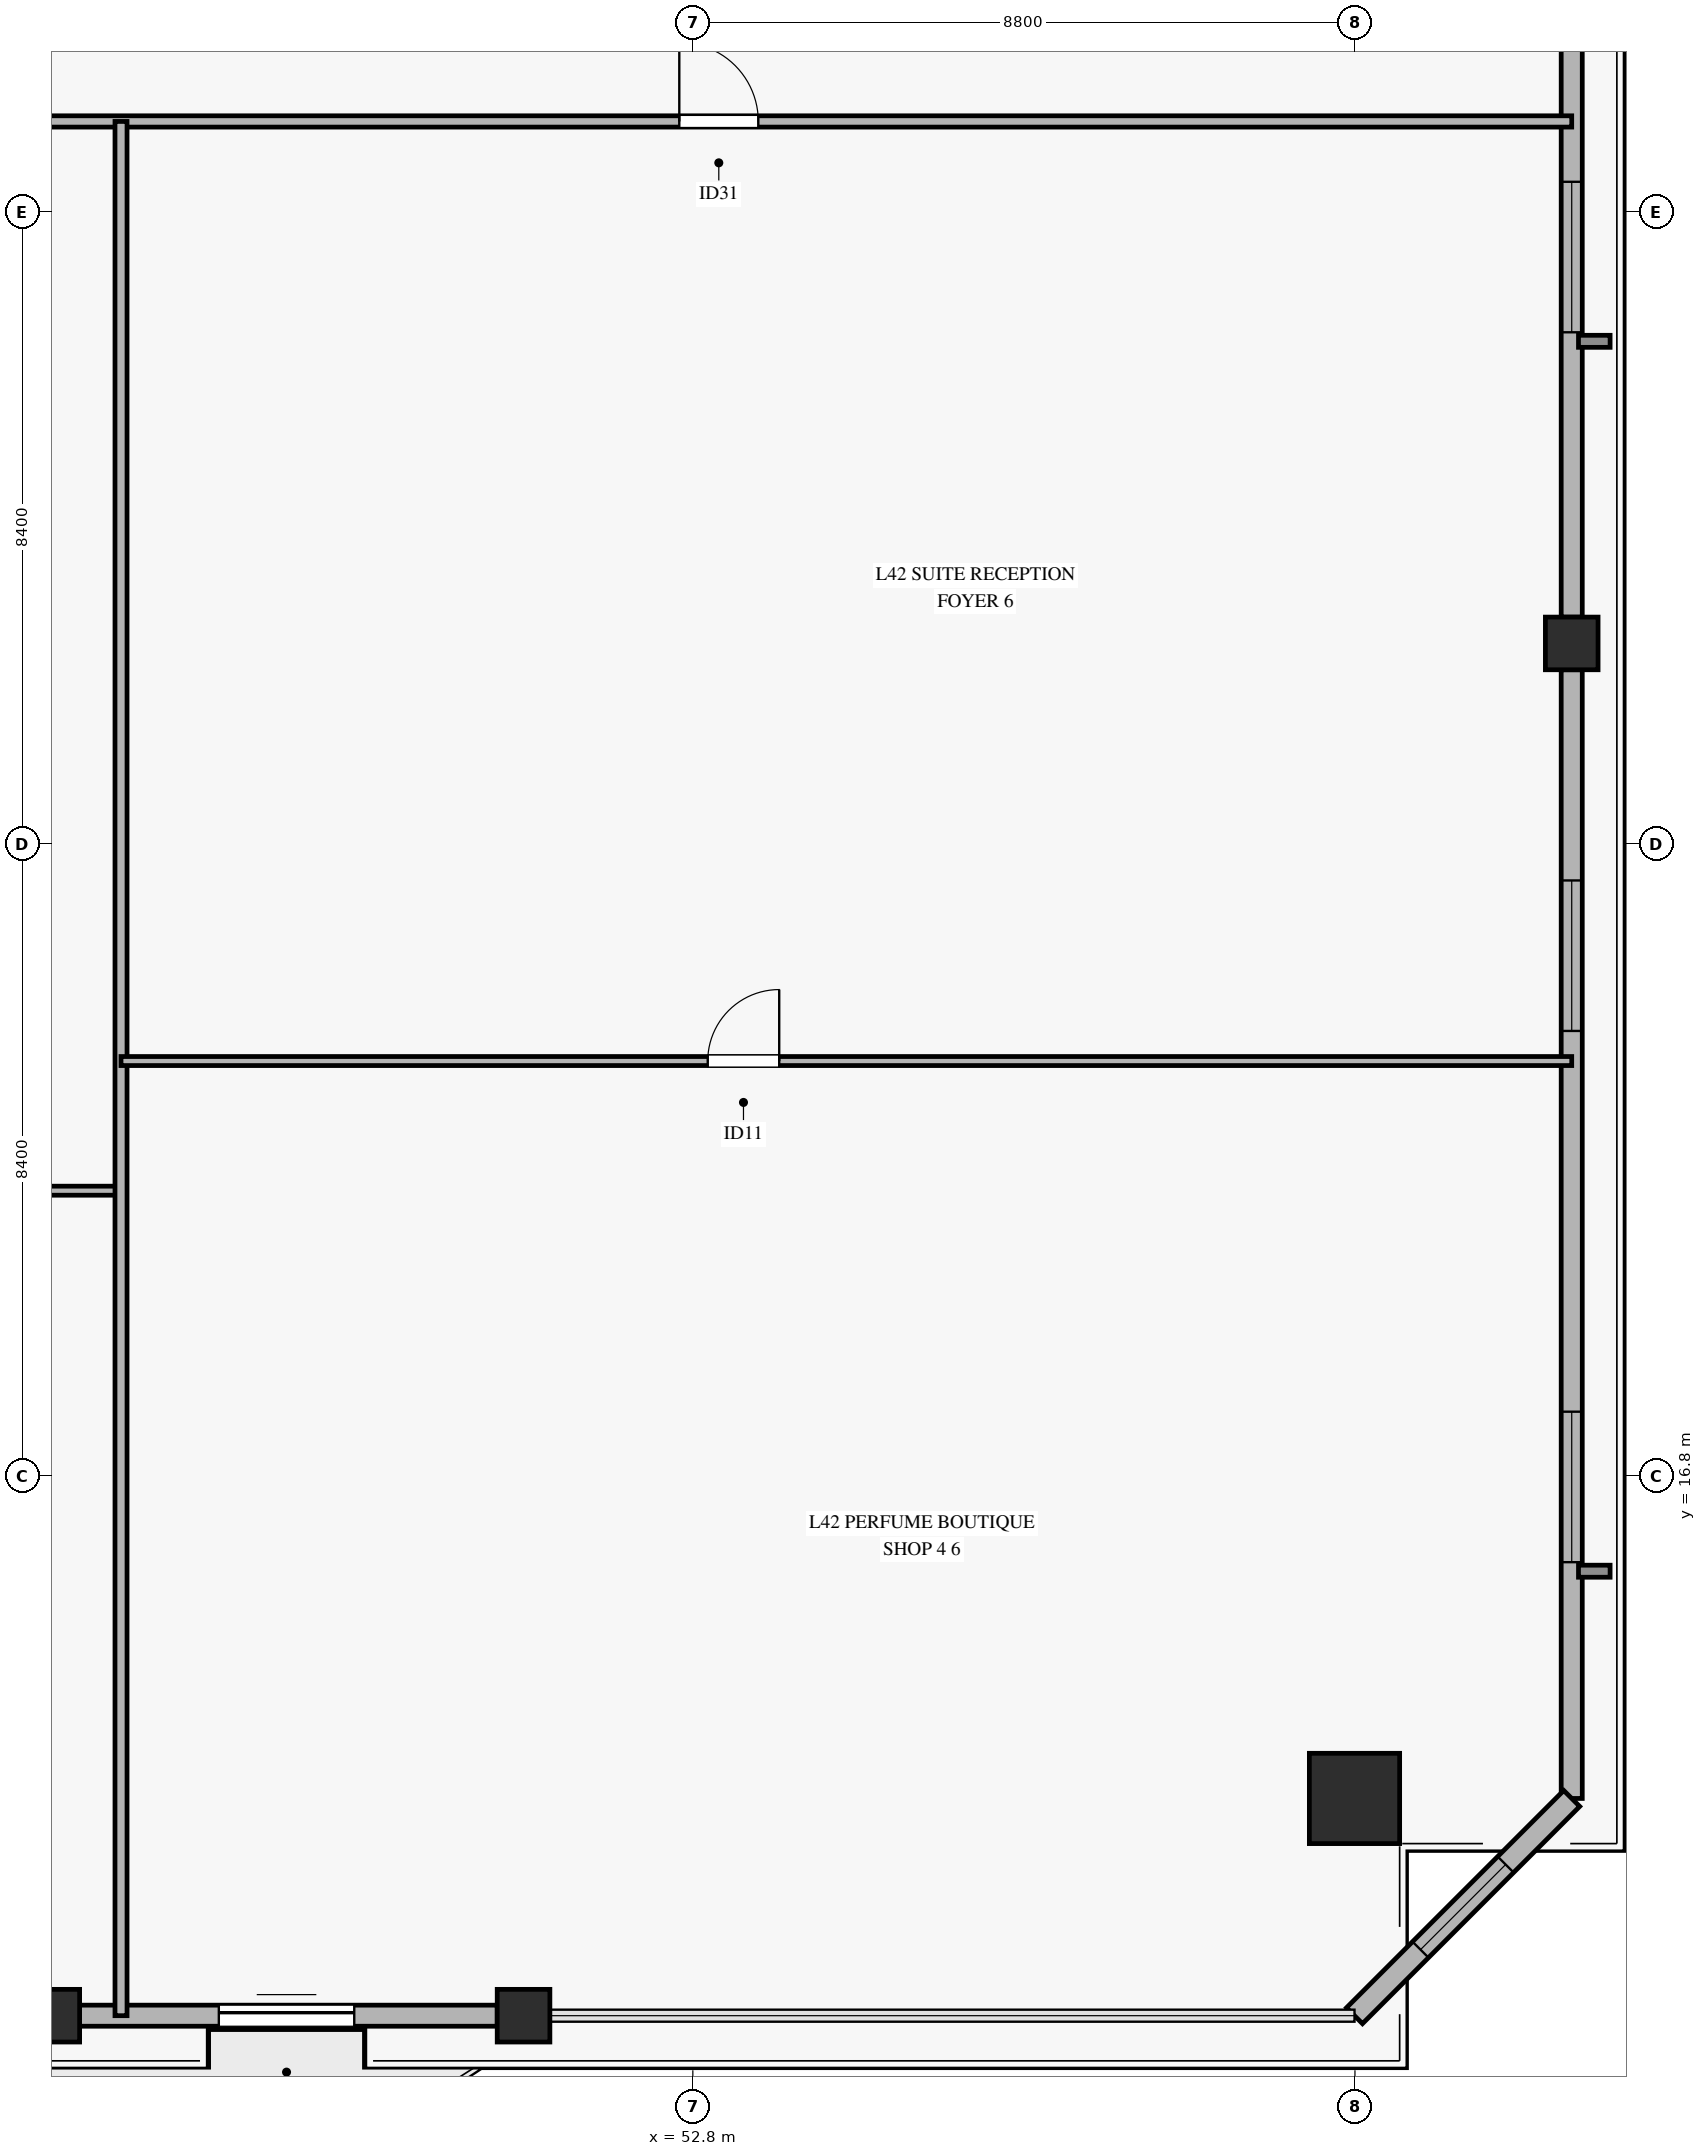
"""IFC4 building model, lengths in metres.
Left out: names, types, materials, properties, quantities, classifications, styles, units other than length and angle.
Written with IfcOpenShell. Run it as: python <this file> out.ifc"""

import sys

from ifc_helpers import new_model, si_unit, direction, frame, frame_2d, origin, origin_2d, place, context, subcontext, project, spatial, rectangle, hollow_rectangle, extrude, source, transform, mapped, element, fill, save


model = new_model("IFC4")
c1 = context("Model", 3, precision=1e-05, world=origin(), true_north=direction((0.0, 1.0)))
c2 = subcontext(c1, "Body", "Model", "MODEL_VIEW")
j1 = project(units=[si_unit("LENGTHUNIT", "METRE"), si_unit("PLANEANGLEUNIT", "RADIAN")], contexts=[c1])
p1 = place(None, origin())
s1 = spatial("IfcSite", under=j1, at=p1, CompositionType="ELEMENT")
p2 = place(p1, origin())
s2 = spatial("IfcBuilding", under=s1, at=p2, CompositionType="ELEMENT")
p3 = place(p2, frame((0.0, 0.0, 170.2)))
s3 = spatial("IfcBuildingStorey", under=s2, at=p3, CompositionType="ELEMENT", Elevation=170.2)
m1 = source(origin(), c2, "Body", "SweptSolid", [
    extrude(hollow_rectangle(XDim=1.2, YDim=1.2, WallThickness=0.055, at=origin_2d()), origin(), (0.0, 0.0, 1.0), 3.27),
])
p4 = place(p3, frame((61.594, 12.513, 0.0), z_axis=(0.0, 0.0, 1.0), x_axis=(1.0, 0.0, 0.0)))
e1 = element("IfcColumn", 1, at=p4, inside=s3, PredefinedType="COLUMN", context=c2, shape_type="MappedRepresentation", body=[
    mapped(m1, transform((0.0, 0.0, 0.0), x_axis=(1.0, 0.0, 0.0), y_axis=(0.0, 1.0, 0.0), z_axis=(0.0, 0.0, 1.0), scale=1.0)),
])
m2 = source(origin(), c2, "Body", "SweptSolid", [
    extrude(hollow_rectangle(XDim=0.7, YDim=0.7, WallThickness=0.032, at=origin_2d()), origin(), (0.0, 0.0, 1.0), 3.27),
])
for number, where, z_axis, x_axis in (
    (2, (44.3, 9.626, 0.0), (0.0, 0.0, 1.0), (1.0, 0.0, 0.0)),
    (3, (50.55, 9.626, 0.0), (0.0, 0.0, 1.0), (1.0, 0.0, 0.0)),
    (4, (64.481, 27.863, 0.0), (0.0, 0.0, 1.0), (1.0, 0.0, 0.0)),
):
    element("IfcColumn", number, at=place(p3, frame(where, z_axis=z_axis, x_axis=x_axis)), inside=s3, PredefinedType="COLUMN", context=c2, shape_type="MappedRepresentation", body=[
        mapped(m2, transform((0.0, 0.0, 0.0), x_axis=(1.0, 0.0, 0.0), y_axis=(0.0, 1.0, 0.0), z_axis=(0.0, 0.0, 1.0), scale=1.0)),
    ])
p5 = place(p3, frame((44.65, 9.626, 0.0), z_axis=(0.0, 0.0, 1.0), x_axis=(1.0, 0.0, 0.0)))
e5 = element("IfcWall", 5, at=p5, inside=s3, PredefinedType="SOLIDWALL", context=c2, shape_type="SweptSolid", body=[
    extrude(rectangle(XDim=5.55, YDim=0.28, at=frame_2d((2.775, 0.0))), origin(), (0.0, 0.0, 1.0), 2.75),
])
p6 = place(p5, frame((1.85, 0.0, 0.0)))
e6 = element("IfcOpeningElement", 6, at=p6, cuts=e5, PredefinedType="OPENING", context=c2, shape_type="SweptSolid", body=[
    extrude(rectangle(XDim=1.8, YDim=2.25, at=frame_2d((0.9, 1.125))), frame((0.0, 0.15, 0.0), z_axis=(0.0, -1.0, 0.0), x_axis=(1.0, 0.0, 0.0)), (0.0, 0.0, 1.0), 0.3),
])
p7 = place(p3, frame((64.481, 12.513, 0.0), z_axis=(0.0, 0.0, 1.0), x_axis=(0.0, 1.0, 0.0)))
e7 = element("IfcWall", 7, at=p7, inside=s3, PredefinedType="SOLIDWALL", context=c2, shape_type="SweptSolid", body=[
    extrude(rectangle(XDim=15.0, YDim=0.28, at=frame_2d((7.5, 0.0))), origin(), (0.0, 0.0, 1.0), 2.75),
])
p8 = place(p7, frame((3.14, 0.0, 0.45)))
e8 = element("IfcOpeningElement", 8, at=p8, cuts=e7, PredefinedType="OPENING", context=c2, shape_type="SweptSolid", body=[
    extrude(rectangle(XDim=2.0, YDim=2.0, at=frame_2d((1.0, 1.0))), frame((0.0, 0.15, 0.0), z_axis=(0.0, -1.0, 0.0), x_axis=(1.0, 0.0, 0.0)), (0.0, 0.0, 1.0), 0.3),
])
p9 = place(p7, frame((10.2, 0.0, 0.45)))
e9 = element("IfcOpeningElement", 9, at=p9, cuts=e7, PredefinedType="OPENING", context=c2, shape_type="SweptSolid", body=[
    extrude(rectangle(XDim=2.0, YDim=2.0, at=frame_2d((1.0, 1.0))), frame((0.0, 0.15, 0.0), z_axis=(0.0, -1.0, 0.0), x_axis=(1.0, 0.0, 0.0)), (0.0, 0.0, 1.0), 0.3),
])
p10 = place(p3, frame((64.481, 28.213, 0.0), z_axis=(0.0, 0.0, 1.0), x_axis=(0.0, 1.0, 0.0)))
e10 = element("IfcWall", 10, at=p10, inside=s3, PredefinedType="SOLIDWALL", context=c2, shape_type="SweptSolid", body=[
    extrude(rectangle(XDim=15.0, YDim=0.28, at=frame_2d((7.5, 0.0))), origin(), (0.0, 0.0, 1.0), 2.75),
])
p11 = place(p10, frame((3.785, 0.0, 0.45)))
e11 = element("IfcOpeningElement", 11, at=p11, cuts=e10, PredefinedType="OPENING", context=c2, shape_type="SweptSolid", body=[
    extrude(rectangle(XDim=2.0, YDim=2.0, at=frame_2d((1.0, 1.0))), frame((0.0, 0.15, 0.0), z_axis=(0.0, -1.0, 0.0), x_axis=(1.0, 0.0, 0.0)), (0.0, 0.0, 1.0), 0.3),
])
p12 = place(p3, frame((61.594, 9.626, 0.0), z_axis=(0.0, 0.0, 1.0), x_axis=(0.707106781187, 0.707106781187, 0.0)))
e12 = element("IfcWall", 12, at=p12, inside=s3, PredefinedType="SOLIDWALL", context=c2, shape_type="SweptSolid", body=[
    extrude(rectangle(XDim=4.083, YDim=0.3, at=frame_2d((2.042, 0.0))), origin(), (0.0, 0.0, 1.0), 2.75),
])
p13 = place(p12, frame((1.241, 0.0, 0.45)))
e13 = element("IfcOpeningElement", 13, at=p13, cuts=e12, PredefinedType="OPENING", context=c2, shape_type="SweptSolid", body=[
    extrude(rectangle(XDim=1.6, YDim=2.0, at=frame_2d((0.8, 1.0))), frame((0.0, 0.16, 0.0), z_axis=(0.0, -1.0, 0.0), x_axis=(1.0, 0.0, 0.0)), (0.0, 0.0, 1.0), 0.32),
])
p14 = place(p3, frame((5.919, 34.8, 0.0), z_axis=(0.0, 0.0, 1.0), x_axis=(1.0, 0.0, 0.0)))
e14 = element("IfcWall", 14, at=p14, inside=s3, PredefinedType="PARTITIONING", context=c2, shape_type="SweptSolid", body=[
    extrude(rectangle(XDim=58.562, YDim=0.15, at=frame_2d((29.281, 0.0))), origin(), (0.0, 0.0, 1.0), 2.455),
])
p15 = place(p14, frame((6.556, 0.0, 0.0)))
e15 = element("IfcOpeningElement", 15, at=p15, cuts=e14, PredefinedType="OPENING", context=c2, shape_type="SweptSolid", body=[
    extrude(rectangle(XDim=1.05, YDim=2.15, at=frame_2d((0.525, 1.075))), frame((0.0, 0.085, 0.0), z_axis=(0.0, -1.0, 0.0), x_axis=(1.0, 0.0, 0.0)), (0.0, 0.0, 1.0), 0.17),
])
p16 = place(p14, frame((19.006, 0.0, 0.0)))
e16 = element("IfcOpeningElement", 16, at=p16, cuts=e14, PredefinedType="OPENING", context=c2, shape_type="SweptSolid", body=[
    extrude(rectangle(XDim=1.05, YDim=2.15, at=frame_2d((0.525, 1.075))), frame((0.0, 0.085, 0.0), z_axis=(0.0, -1.0, 0.0), x_axis=(1.0, 0.0, 0.0)), (0.0, 0.0, 1.0), 0.17),
])
p17 = place(p14, frame((24.978, 0.0, 0.0)))
e17 = element("IfcOpeningElement", 17, at=p17, cuts=e14, PredefinedType="OPENING", context=c2, shape_type="SweptSolid", body=[
    extrude(rectangle(XDim=1.05, YDim=2.15, at=frame_2d((0.525, 1.075))), frame((0.0, 0.085, 0.0), z_axis=(0.0, -1.0, 0.0), x_axis=(1.0, 0.0, 0.0)), (0.0, 0.0, 1.0), 0.17),
])
p18 = place(p14, frame((30.851, 0.0, 0.0)))
e18 = element("IfcOpeningElement", 18, at=p18, cuts=e14, PredefinedType="OPENING", context=c2, shape_type="SweptSolid", body=[
    extrude(rectangle(XDim=1.05, YDim=2.15, at=frame_2d((0.525, 1.075))), frame((0.0, 0.085, 0.0), z_axis=(0.0, -1.0, 0.0), x_axis=(1.0, 0.0, 0.0)), (0.0, 0.0, 1.0), 0.17),
])
p19 = place(p14, frame((36.397, 0.0, 0.0)))
e19 = element("IfcOpeningElement", 19, at=p19, cuts=e14, PredefinedType="OPENING", context=c2, shape_type="SweptSolid", body=[
    extrude(rectangle(XDim=1.05, YDim=2.15, at=frame_2d((0.525, 1.075))), frame((0.0, 0.085, 0.0), z_axis=(0.0, -1.0, 0.0), x_axis=(1.0, 0.0, 0.0)), (0.0, 0.0, 1.0), 0.17),
])
p20 = place(p14, frame((46.701, 0.0, 0.0)))
e20 = element("IfcOpeningElement", 20, at=p20, cuts=e14, PredefinedType="OPENING", context=c2, shape_type="SweptSolid", body=[
    extrude(rectangle(XDim=1.05, YDim=2.15, at=frame_2d((0.525, 1.075))), frame((0.0, 0.085, 0.0), z_axis=(0.0, -1.0, 0.0), x_axis=(1.0, 0.0, 0.0)), (0.0, 0.0, 1.0), 0.17),
])
p21 = place(p3, frame((39.8, 20.59, 0.0), z_axis=(0.0, 0.0, 1.0), x_axis=(1.0, 0.0, 0.0)))
e21 = element("IfcWall", 21, at=p21, inside=s3, PredefinedType="PARTITIONING", context=c2, shape_type="SweptSolid", body=[
    extrude(rectangle(XDim=5.4, YDim=0.12, at=frame_2d((2.7, 0.0))), origin(), (0.0, 0.0, 1.0), 2.455),
])
p22 = place(p21, frame((2.425, 0.0, 0.0)))
e22 = element("IfcOpeningElement", 22, at=p22, cuts=e21, PredefinedType="OPENING", context=c2, shape_type="SweptSolid", body=[
    extrude(rectangle(XDim=0.95, YDim=2.1, at=frame_2d((0.475, 1.05))), frame((0.0, 0.07, 0.0), z_axis=(0.0, -1.0, 0.0), x_axis=(1.0, 0.0, 0.0)), (0.0, 0.0, 1.0), 0.14),
])
p23 = place(p3, frame((45.2, 9.626, 0.0), z_axis=(0.0, 0.0, 1.0), x_axis=(0.0, 1.0, 0.0)))
e23 = element("IfcWall", 23, at=p23, inside=s3, PredefinedType="PARTITIONING", context=c2, shape_type="SweptSolid", body=[
    extrude(rectangle(XDim=25.174, YDim=0.16, at=frame_2d((12.587, 0.0))), origin(), (0.0, 0.0, 1.0), 2.755),
])
p24 = place(p3, frame((45.2, 22.313, 0.0), z_axis=(0.0, 0.0, 1.0), x_axis=(1.0, 0.0, 0.0)))
e24 = element("IfcWall", 24, at=p24, inside=s3, PredefinedType="PARTITIONING", context=c2, shape_type="SweptSolid", body=[
    extrude(rectangle(XDim=19.281, YDim=0.12, at=frame_2d((9.641, 0.0))), origin(), (0.0, 0.0, 1.0), 2.455),
])
p25 = place(p24, frame((7.798, 0.0, 0.0)))
e25 = element("IfcOpeningElement", 25, at=p25, cuts=e24, PredefinedType="OPENING", context=c2, shape_type="SweptSolid", body=[
    extrude(rectangle(XDim=0.95, YDim=2.1, at=frame_2d((0.475, 1.05))), frame((0.0, 0.07, 0.0), z_axis=(0.0, -1.0, 0.0), x_axis=(1.0, 0.0, 0.0)), (0.0, 0.0, 1.0), 0.14),
])
m3 = source(origin(), c2, "Body", "SweptSolid", [
    extrude(rectangle(XDim=1.8, YDim=2.25, at=frame_2d((0.9, 1.125))), frame((0.0, 0.025, 0.0), z_axis=(0.0, -1.0, 0.0), x_axis=(1.0, 0.0, 0.0)), (0.0, 0.0, 1.0), 0.05),
])
p26 = place(p6, origin())
e26 = element("IfcDoor", 26, at=p26, inside=s3, OperationType="SLIDING_TO_LEFT", PredefinedType="DOOR", context=c2, shape_type="MappedRepresentation", body=[
    mapped(m3, transform((0.0, 0.0, 0.0), x_axis=(1.0, 0.0, 0.0), y_axis=(0.0, 1.0, 0.0), z_axis=(0.0, 0.0, 1.0), scale=1.0)),
])
fill(e6, e26)
m4 = source(origin(), c2, "Body", "SweptSolid", [
    extrude(rectangle(XDim=2.0, YDim=2.0, at=frame_2d((1.0, 1.0))), frame((0.0, 0.03, 0.0), z_axis=(0.0, -1.0, 0.0), x_axis=(1.0, 0.0, 0.0)), (0.0, 0.0, 1.0), 0.06),
])
p27 = place(p8, origin())
e27 = element("IfcWindow", 27, at=p27, inside=s3, PartitioningType="SINGLE_PANEL", PredefinedType="WINDOW", context=c2, shape_type="MappedRepresentation", body=[
    mapped(m4, transform((0.0, 0.0, 0.0), x_axis=(1.0, 0.0, 0.0), y_axis=(0.0, 1.0, 0.0), z_axis=(0.0, 0.0, 1.0), scale=1.0)),
])
fill(e8, e27)
p28 = place(p9, origin())
e28 = element("IfcWindow", 28, at=p28, inside=s3, PartitioningType="SINGLE_PANEL", PredefinedType="WINDOW", context=c2, shape_type="MappedRepresentation", body=[
    mapped(m4, transform((0.0, 0.0, 0.0), x_axis=(1.0, 0.0, 0.0), y_axis=(0.0, 1.0, 0.0), z_axis=(0.0, 0.0, 1.0), scale=1.0)),
])
fill(e9, e28)
p29 = place(p11, origin())
e29 = element("IfcWindow", 29, at=p29, inside=s3, PartitioningType="SINGLE_PANEL", PredefinedType="WINDOW", context=c2, shape_type="MappedRepresentation", body=[
    mapped(m4, transform((0.0, 0.0, 0.0), x_axis=(1.0, 0.0, 0.0), y_axis=(0.0, 1.0, 0.0), z_axis=(0.0, 0.0, 1.0), scale=1.0)),
])
fill(e11, e29)
m5 = source(origin(), c2, "Body", "SweptSolid", [
    extrude(rectangle(XDim=1.6, YDim=2.0, at=frame_2d((0.8, 1.0))), frame((0.0, 0.03, 0.0), z_axis=(0.0, -1.0, 0.0), x_axis=(1.0, 0.0, 0.0)), (0.0, 0.0, 1.0), 0.06),
])
p30 = place(p13, origin())
e30 = element("IfcWindow", 30, at=p30, inside=s3, PartitioningType="SINGLE_PANEL", PredefinedType="WINDOW", context=c2, shape_type="MappedRepresentation", body=[
    mapped(m5, transform((0.0, 0.0, 0.0), x_axis=(1.0, 0.0, 0.0), y_axis=(0.0, 1.0, 0.0), z_axis=(0.0, 0.0, 1.0), scale=1.0)),
])
fill(e13, e30)
m6 = source(origin(), c2, "Body", "SweptSolid", [
    extrude(rectangle(XDim=1.05, YDim=2.15, at=frame_2d((0.525, 1.075))), frame((0.0, 0.025, 0.0), z_axis=(0.0, -1.0, 0.0), x_axis=(1.0, 0.0, 0.0)), (0.0, 0.0, 1.0), 0.05),
])
p31 = place(p20, origin())
e31 = element("IfcDoor", 31, at=p31, inside=s3, OperationType="SINGLE_SWING_LEFT", PredefinedType="DOOR", context=c2, shape_type="MappedRepresentation", body=[
    mapped(m6, transform((0.0, 0.0, 0.0), x_axis=(1.0, 0.0, 0.0), y_axis=(0.0, 1.0, 0.0), z_axis=(0.0, 0.0, 1.0), scale=1.0)),
])
fill(e20, e31)
m7 = source(origin(), c2, "Body", "SweptSolid", [
    extrude(rectangle(XDim=0.95, YDim=2.1, at=frame_2d((0.475, 1.05))), frame((0.0, 0.025, 0.0), z_axis=(0.0, -1.0, 0.0), x_axis=(1.0, 0.0, 0.0)), (0.0, 0.0, 1.0), 0.05),
])
p32 = place(p25, origin())
e32 = element("IfcDoor", 32, at=p32, inside=s3, OperationType="SINGLE_SWING_RIGHT", PredefinedType="DOOR", context=c2, shape_type="MappedRepresentation", body=[
    mapped(m7, transform((0.0, 0.0, 0.0), x_axis=(1.0, 0.0, 0.0), y_axis=(0.0, 1.0, 0.0), z_axis=(0.0, 0.0, 1.0), scale=1.0)),
])
fill(e25, e32)
save(model, sys.argv[1])
